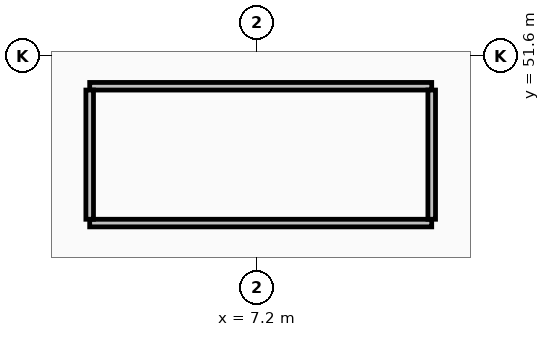
"""IFC4 building model, lengths in metres.
Left out: names, types, materials, properties, quantities, classifications, styles, units other than length and angle.
Written with IfcOpenShell. Run it as: python <this file> out.ifc"""

import sys

from ifc_helpers import new_model, si_unit, direction, frame, frame_2d, origin, place, context, subcontext, project, spatial, rectangle, extrude, element, fill, save


model = new_model("IFC4")
c1 = context("Model", 3, precision=1e-05, world=origin(), true_north=direction((0.0, 1.0)))
c2 = subcontext(c1, "Body", "Model", "MODEL_VIEW")
j1 = project(units=[si_unit("LENGTHUNIT", "METRE"), si_unit("PLANEANGLEUNIT", "RADIAN")], contexts=[c1])
p1 = place(None, origin())
s1 = spatial("IfcSite", under=j1, at=p1, CompositionType="ELEMENT")
p2 = place(p1, origin())
s2 = spatial("IfcBuilding", under=s1, at=p2, CompositionType="ELEMENT")
p3 = place(p2, origin())
s3 = spatial("IfcBuildingStorey", under=s2, at=p3, CompositionType="ELEMENT", Elevation=0.0)
for number, where, z_axis, x_axis in (
    (1, (2.8, 47.2, 0.0), (0.0, 0.0, 1.0), (1.0, 0.0, 0.0)),
    (2, (11.8, 50.8, 0.0), (0.0, 0.0, 1.0), (-1.0, 0.0, 0.0)),
):
    element("IfcWall", number, at=place(p3, frame(where, z_axis=z_axis, x_axis=x_axis)), inside=s3, PredefinedType="SHEAR", context=c2, shape_type="SweptSolid", body=[
        extrude(rectangle(XDim=9.0, YDim=0.2, at=frame_2d((4.5, 0.0))), origin(), (0.0, 0.0, 1.0), 6.6),
    ])
p4 = place(p3, frame((2.8, 47.3, 0.0), z_axis=(0.0, 0.0, 1.0), x_axis=(0.0, 1.0, 0.0)))
e3 = element("IfcWall", 3, at=p4, inside=s3, PredefinedType="SHEAR", context=c2, shape_type="SweptSolid", body=[
    extrude(rectangle(XDim=3.4, YDim=0.2, at=frame_2d((1.7, 0.0))), origin(), (0.0, 0.0, 1.0), 6.6),
])
p5 = place(p4, frame((1.1, 0.0, 0.0)))
e4 = element("IfcOpeningElement", 4, at=p5, cuts=e3, PredefinedType="OPENING", context=c2, shape_type="SweptSolid", body=[
    extrude(rectangle(XDim=1.2, YDim=2.15, at=frame_2d((0.6, 1.075))), frame((0.0, 0.11, 0.0), z_axis=(0.0, -1.0, 0.0), x_axis=(1.0, 0.0, 0.0)), (0.0, 0.0, 1.0), 0.22),
])
p6 = place(p3, frame((11.8, 47.3, 0.0), z_axis=(0.0, 0.0, 1.0), x_axis=(0.0, 1.0, 0.0)))
e5 = element("IfcWall", 5, at=p6, inside=s3, PredefinedType="SHEAR", context=c2, shape_type="SweptSolid", body=[
    extrude(rectangle(XDim=3.4, YDim=0.2, at=frame_2d((1.7, 0.0))), origin(), (0.0, 0.0, 1.0), 6.6),
])
p7 = place(p5, origin())
e6 = element("IfcDoor", 6, at=p7, inside=s3, OperationType="SINGLE_SWING_LEFT", PredefinedType="DOOR", context=c2, shape_type="SweptSolid", body=[
    extrude(rectangle(XDim=1.2, YDim=2.15, at=frame_2d((0.6, 1.075))), frame((0.0, 0.025, 0.0), z_axis=(0.0, -1.0, 0.0), x_axis=(1.0, 0.0, 0.0)), (0.0, 0.0, 1.0), 0.05),
])
fill(e4, e6)
save(model, sys.argv[1])
